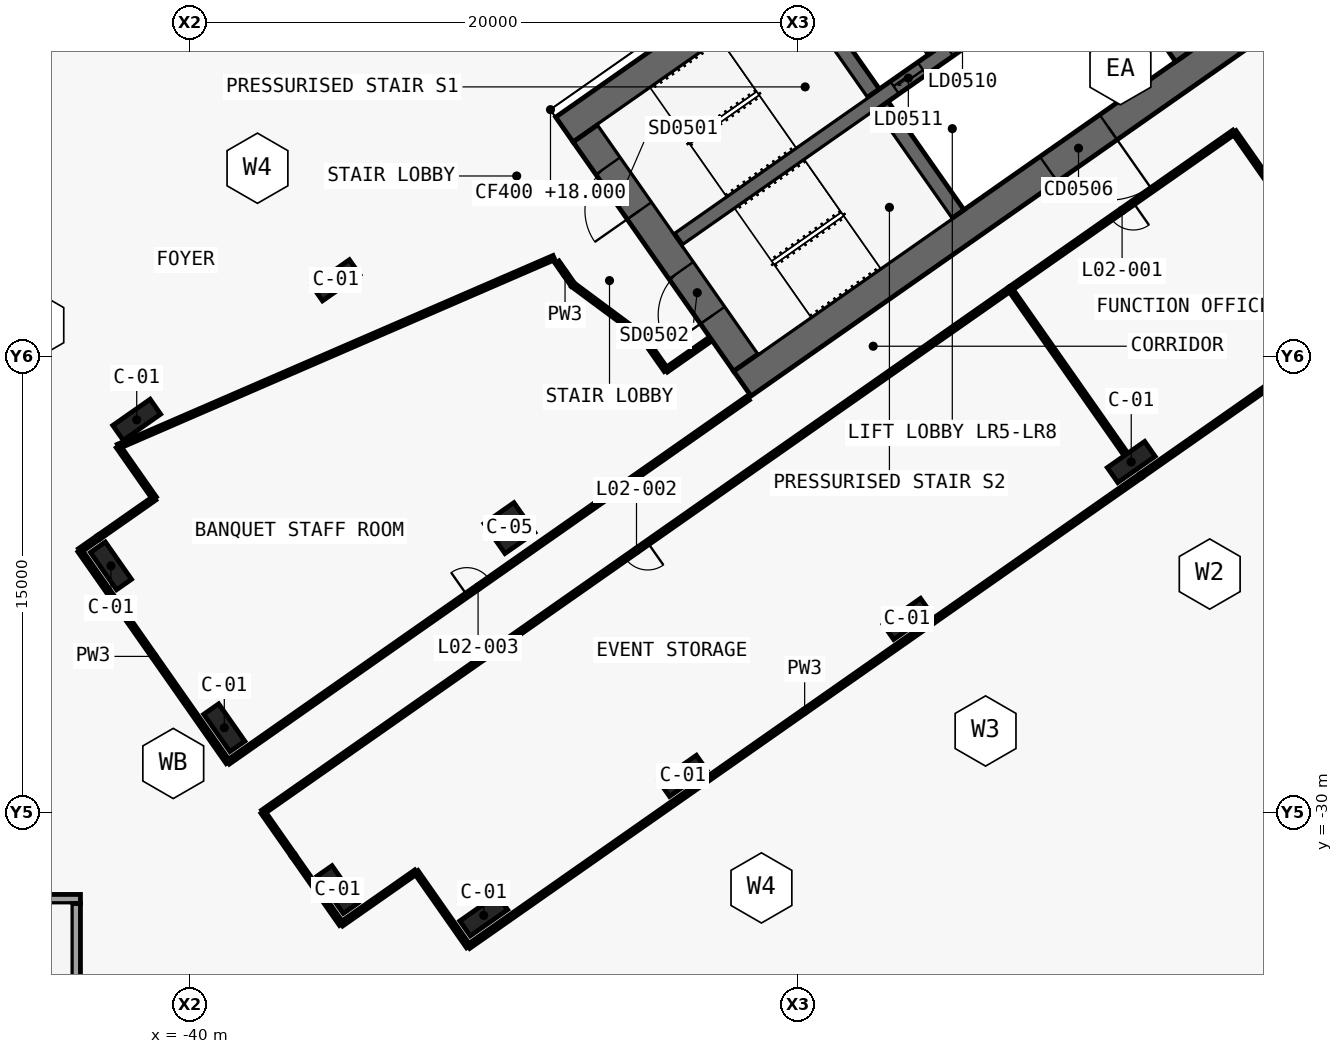
"""IFC4 building model, lengths in metres.
Left out: names, types, materials, properties, quantities, classifications, styles, units other than length and angle.
Written with IfcOpenShell. Run it as: python <this file> out.ifc"""

import sys

from ifc_helpers import new_model, si_unit, direction, frame, frame_2d, origin, origin_2d, place, context, subcontext, project, spatial, polyline, rectangle, outline, extrude, element, fill, save


model = new_model("IFC4")
c1 = context("Model", 3, precision=1e-05, world=origin(), true_north=direction((0.0, 1.0)))
c2 = subcontext(c1, "Body", "Model", "MODEL_VIEW")
j1 = project(units=[si_unit("LENGTHUNIT", "METRE"), si_unit("PLANEANGLEUNIT", "RADIAN")], contexts=[c1])
p1 = place(None, origin())
s1 = spatial("IfcSite", under=j1, at=p1, CompositionType="ELEMENT")
p2 = place(p1, origin())
s2 = spatial("IfcBuilding", under=s1, at=p2, CompositionType="ELEMENT")
p3 = place(p2, frame((0.0, 0.0, 18.0)))
s3 = spatial("IfcBuildingStorey", under=s2, at=p3, CompositionType="ELEMENT", Elevation=18.0)
p4 = place(p3, frame((0.037, 11.867, 0.0), z_axis=(0.0, 0.0, 1.0), x_axis=(-0.819155306259, -0.573571777746, 0.0)))
e1 = element("IfcWall", 1, at=p4, inside=s3, PredefinedType="SHEAR", context=c2, shape_type="SweptSolid", body=[
    extrude(outline(polyline([(33.837, 0.5), (0.7, 0.5), (0.0, -0.5), (33.837, -0.5), (33.837, 0.5)])), origin(), (0.0, 0.0, 1.0), 8.0),
])
p5 = place(p3, frame((0.037, -0.585, 0.0), z_axis=(0.0, 0.0, 1.0), x_axis=(-0.819157152511, -0.573569140985, 0.0)))
e2 = element("IfcWall", 2, at=p5, inside=s3, PredefinedType="SHEAR", context=c2, shape_type="SweptSolid", body=[
    extrude(outline(polyline([(26.695, 0.5), (0.7, 0.5), (0.0, -0.5), (26.695, -0.5), (26.695, 0.5)])), origin(), (0.0, 0.0, 1.0), 8.0),
])
p6 = place(p5, frame((2.995, 0.0, 0.0)))
e3 = element("IfcOpeningElement", 3, at=p6, cuts=e2, PredefinedType="OPENING", context=c2, shape_type="SweptSolid", body=[
    extrude(rectangle(XDim=2.4, YDim=2.1, at=frame_2d((1.2, 1.05))), frame((0.0, 0.51, 0.0), z_axis=(0.0, -1.0, 0.0), x_axis=(1.0, 0.0, 0.0)), (0.0, 0.0, 1.0), 1.02),
])
p7 = place(p5, frame((11.995, 0.0, 0.0)))
e4 = element("IfcOpeningElement", 4, at=p7, cuts=e2, PredefinedType="OPENING", context=c2, shape_type="SweptSolid", body=[
    extrude(rectangle(XDim=2.4, YDim=2.1, at=frame_2d((1.2, 1.05))), frame((0.0, 0.51, 0.0), z_axis=(0.0, -1.0, 0.0), x_axis=(1.0, 0.0, 0.0)), (0.0, 0.0, 1.0), 1.02),
])
p8 = place(p3, frame((-21.708, -15.2, 0.0), z_axis=(0.0, 0.0, 1.0), x_axis=(-0.573576324356, 0.819152122709, 0.0)))
e5 = element("IfcWall", 5, at=p8, inside=s3, PredefinedType="SHEAR", context=c2, shape_type="SweptSolid", body=[
    extrude(outline(polyline([(0.0, 0.5), (0.0, -0.5), (9.2, -0.5), (9.2, 0.5), (0.0, 0.5)])), origin(), (0.0, 0.0, 1.0), 8.0),
])
p9 = place(p8, frame((6.1, 0.0, 0.0)))
e6 = element("IfcOpeningElement", 6, at=p9, cuts=e5, PredefinedType="OPENING", context=c2, shape_type="SweptSolid", body=[
    extrude(rectangle(XDim=1.8, YDim=2.1, at=frame_2d((0.9, 1.05))), frame((0.0, 0.51, 0.0), z_axis=(0.0, -1.0, 0.0), x_axis=(1.0, 0.0, 0.0)), (0.0, 0.0, 1.0), 1.02),
])
p10 = place(p8, frame((1.9, 0.0, 0.0)))
e7 = element("IfcOpeningElement", 7, at=p10, cuts=e5, PredefinedType="OPENING", context=c2, shape_type="SweptSolid", body=[
    extrude(rectangle(XDim=1.8, YDim=2.1, at=frame_2d((0.9, 1.05))), frame((0.0, 0.51, 0.0), z_axis=(0.0, -1.0, 0.0), x_axis=(1.0, 0.0, 0.0)), (0.0, 0.0, 1.0), 1.02),
])
p11 = place(p3, frame((-7.372, -5.162, 0.0), z_axis=(0.0, 0.0, 1.0), x_axis=(-0.573594173421, 0.819139624372, 0.0)))
e8 = element("IfcWall", 8, at=p11, inside=s3, PredefinedType="SHEAR", context=c2, shape_type="SweptSolid", body=[
    extrude(outline(polyline([(4.35, 0.25), (0.0, 0.25), (0.0, -0.25), (4.35, -0.25), (4.35, 0.25)])), origin(), (0.0, 0.0, 1.0), 8.0),
])
p12 = place(p3, frame((-14.745, -10.324, 0.0), z_axis=(0.0, 0.0, 1.0), x_axis=(-0.57356780395, 0.819158088694, 0.0)))
e9 = element("IfcWall", 9, at=p12, inside=s3, PredefinedType="SHEAR", context=c2, shape_type="SweptSolid", body=[
    extrude(outline(polyline([(4.35, 0.25), (0.0, 0.25), (0.0, -0.25), (4.35, -0.25), (4.35, 0.25)])), origin(), (0.0, 0.0, 1.0), 8.0),
])
p13 = place(p3, frame((-17.527, -6.352, 0.0), z_axis=(0.0, 0.0, 1.0), x_axis=(-0.573530143085, 0.819184457233, 0.0)))
e10 = element("IfcWall", 10, at=p13, inside=s3, PredefinedType="SHEAR", context=c2, shape_type="SweptSolid", body=[
    extrude(outline(polyline([(4.35, -0.25), (4.35, 0.25), (0.0, 0.25), (0.0, -0.25), (4.35, -0.25)])), origin(), (0.0, 0.0, 1.0), 8.0),
])
p14 = place(p3, frame((-2.638, 3.768, 0.0), z_axis=(0.0, 0.0, 1.0), x_axis=(-0.819148977158, -0.573580816643, 0.0)))
e11 = element("IfcWall", 11, at=p14, inside=s3, PredefinedType="SHEAR", context=c2, shape_type="SweptSolid", body=[
    extrude(outline(polyline([(26.0, 0.25), (0.0, 0.25), (0.0, -0.25), (26.0, -0.25), (26.0, 0.25)])), origin(), (0.0, 0.0, 1.0), 8.0),
])
p15 = place(p14, frame((1.169, 0.0, 0.0)))
e12 = element("IfcOpeningElement", 12, at=p15, cuts=e11, PredefinedType="OPENING", context=c2, shape_type="SweptSolid", body=[
    extrude(rectangle(XDim=1.1, YDim=2.1, at=frame_2d((0.55, 1.05))), frame((0.0, 0.26, 0.0), z_axis=(0.0, -1.0, 0.0), x_axis=(1.0, 0.0, 0.0)), (0.0, 0.0, 1.0), 0.52),
])
p16 = place(p14, frame((3.206, 0.0, 0.0)))
e13 = element("IfcOpeningElement", 13, at=p16, cuts=e11, PredefinedType="OPENING", context=c2, shape_type="SweptSolid", body=[
    extrude(rectangle(XDim=1.1, YDim=2.1, at=frame_2d((0.55, 1.05))), frame((0.0, 0.26, 0.0), z_axis=(0.0, -1.0, 0.0), x_axis=(1.0, 0.0, 0.0)), (0.0, 0.0, 1.0), 0.52),
])
p17 = place(p14, frame((5.244, 0.0, 0.0)))
e14 = element("IfcOpeningElement", 14, at=p17, cuts=e11, PredefinedType="OPENING", context=c2, shape_type="SweptSolid", body=[
    extrude(rectangle(XDim=1.1, YDim=2.1, at=frame_2d((0.55, 1.05))), frame((0.0, 0.26, 0.0), z_axis=(0.0, -1.0, 0.0), x_axis=(1.0, 0.0, 0.0)), (0.0, 0.0, 1.0), 0.52),
])
p18 = place(p14, frame((7.281, 0.0, 0.0)))
e15 = element("IfcOpeningElement", 15, at=p18, cuts=e11, PredefinedType="OPENING", context=c2, shape_type="SweptSolid", body=[
    extrude(rectangle(XDim=1.1, YDim=2.1, at=frame_2d((0.55, 1.05))), frame((0.0, 0.26, 0.0), z_axis=(0.0, -1.0, 0.0), x_axis=(1.0, 0.0, 0.0)), (0.0, 0.0, 1.0), 0.52),
])
p19 = place(p14, frame((9.688, 0.0, 0.0)))
e16 = element("IfcOpeningElement", 16, at=p19, cuts=e11, PredefinedType="OPENING", context=c2, shape_type="SweptSolid", body=[
    extrude(rectangle(XDim=1.1, YDim=2.1, at=frame_2d((0.55, 1.05))), frame((0.0, 0.26, 0.0), z_axis=(0.0, -1.0, 0.0), x_axis=(1.0, 0.0, 0.0)), (0.0, 0.0, 1.0), 0.52),
])
p20 = place(p14, frame((11.863, 0.0, 0.0)))
e17 = element("IfcOpeningElement", 17, at=p20, cuts=e11, PredefinedType="OPENING", context=c2, shape_type="SweptSolid", body=[
    extrude(rectangle(XDim=1.1, YDim=2.1, at=frame_2d((0.55, 1.05))), frame((0.0, 0.26, 0.0), z_axis=(0.0, -1.0, 0.0), x_axis=(1.0, 0.0, 0.0)), (0.0, 0.0, 1.0), 0.52),
])
p21 = place(p14, frame((14.038, 0.0, 0.0)))
e18 = element("IfcOpeningElement", 18, at=p21, cuts=e11, PredefinedType="OPENING", context=c2, shape_type="SweptSolid", body=[
    extrude(rectangle(XDim=1.1, YDim=2.1, at=frame_2d((0.55, 1.05))), frame((0.0, 0.26, 0.0), z_axis=(0.0, -1.0, 0.0), x_axis=(1.0, 0.0, 0.0)), (0.0, 0.0, 1.0), 0.52),
])
p22 = place(p14, frame((16.212, 0.0, 0.0)))
e19 = element("IfcOpeningElement", 19, at=p22, cuts=e11, PredefinedType="OPENING", context=c2, shape_type="SweptSolid", body=[
    extrude(rectangle(XDim=1.1, YDim=2.1, at=frame_2d((0.55, 1.05))), frame((0.0, 0.26, 0.0), z_axis=(0.0, -1.0, 0.0), x_axis=(1.0, 0.0, 0.0)), (0.0, 0.0, 1.0), 0.52),
])
p23 = place(p3, frame((-49.4, -32.85, 0.0), z_axis=(0.0, 0.0, 1.0), x_axis=(1.0, 0.0, 0.0)))
e20 = element("IfcWall", 20, at=p23, inside=s3, PredefinedType="SOLIDWALL", context=c2, shape_type="SweptSolid", body=[
    extrude(rectangle(XDim=5.8, YDim=0.3, at=frame_2d((2.9, 0.0))), origin(), (0.0, 0.0, 1.0), 8.0),
])
p24 = place(p3, frame((-43.75, -43.0, 0.0), z_axis=(0.0, 0.0, 1.0), x_axis=(0.0, 1.0, 0.0)))
e21 = element("IfcWall", 21, at=p24, inside=s3, PredefinedType="SOLIDWALL", context=c2, shape_type="SweptSolid", body=[
    extrude(rectangle(XDim=10.0, YDim=0.3, at=frame_2d((5.0, 0.0))), origin(), (0.0, 0.0, 1.0), 8.0),
])
p25 = place(p24, frame((0.212, 0.0, 0.0)))
e22 = element("IfcOpeningElement", 22, at=p25, cuts=e21, PredefinedType="OPENING", context=c2, shape_type="SweptSolid", body=[
    extrude(rectangle(XDim=2.1, YDim=2.1, at=frame_2d((1.05, 1.05))), frame((0.0, 0.16, 0.0), z_axis=(0.0, -1.0, 0.0), x_axis=(1.0, 0.0, 0.0)), (0.0, 0.0, 1.0), 0.32),
])
for number, where, z_axis, x_axis in (
    (23, (-9.038, -18.475, 0.0), (0.0, 0.0, 1.0), (-0.819, -0.574, 0.0)),
    (24, (-16.41, -23.637, 0.0), (0.0, 0.0, 1.0), (-0.819, -0.574, 0.0)),
    (25, (-23.782, -28.799, 0.0), (0.0, 0.0, 1.0), (-0.819, -0.574, 0.0)),
    (26, (-30.336, -33.388, 0.0), (0.0, 0.0, 1.0), (-0.819, -0.574, 0.0)),
    (27, (-35.197, -12.498, 0.0), (0.0, 0.0, 1.0), (-0.819, -0.574, 0.0)),
    (28, (-41.75, -17.087, 0.0), (0.0, 0.0, 1.0), (-0.819, -0.574, 0.0)),
    (29, (-35.14, -32.541, 0.0), (0.0, 0.0, 1.0), (-0.574, 0.819, 0.0)),
    (30, (-38.869, -27.216, 0.0), (0.0, 0.0, 1.0), (-0.574, 0.819, 0.0)),
    (31, (-42.597, -21.892, 0.0), (0.0, 0.0, 1.0), (-0.574, 0.819, 0.0)),
):
    element("IfcColumn", number, at=place(p3, frame(where, z_axis=z_axis, x_axis=x_axis)), inside=s3, PredefinedType="COLUMN", context=c2, shape_type="SweptSolid", body=[
        extrude(rectangle(XDim=1.5, YDim=0.6, at=origin_2d()), origin(), (0.0, 0.0, 1.0), 8.0),
    ])
p26 = place(p3, frame((-29.49, -20.649, 0.0), z_axis=(0.0, 0.0, 1.0), x_axis=(-0.819152044289, -0.573576436351, 0.0)))
e32 = element("IfcColumn", 32, at=p26, inside=s3, PredefinedType="COLUMN", context=c2, shape_type="SweptSolid", body=[
    extrude(rectangle(XDim=1.2, YDim=1.2, at=origin_2d()), origin(), (0.0, 0.0, 1.0), 8.0),
])
p27 = place(p3, frame((-15.622, -5.018, 0.0), z_axis=(0.0, 0.0, 1.0), x_axis=(-0.573594173421, 0.819139624372, 0.0)))
e33 = element("IfcWall", 33, at=p27, inside=s3, PredefinedType="SOLIDWALL", context=c2, shape_type="SweptSolid", body=[
    extrude(rectangle(XDim=4.35, YDim=0.2, at=frame_2d((2.175, 0.0))), origin(), (0.0, 0.0, 1.0), 8.0),
])
p28 = place(p3, frame((-38.746, -28.351, 0.0), z_axis=(0.0, 0.0, 1.0), x_axis=(0.819148965066, 0.573580833911, 0.0)))
e34 = element("IfcWall", 34, at=p28, inside=s3, PredefinedType="PARTITIONING", context=c2, shape_type="SweptSolid", body=[
    extrude(rectangle(XDim=20.88, YDim=0.15, at=frame_2d((10.44, 0.0))), origin(), (0.0, 0.0, 1.0), 6.18),
])
p29 = place(p28, frame((9.59, 0.0, 0.0)))
e35 = element("IfcOpeningElement", 35, at=p29, cuts=e34, PredefinedType="OPENING", context=c2, shape_type="SweptSolid", body=[
    extrude(rectangle(XDim=0.9, YDim=2.1, at=frame_2d((0.45, 1.05))), frame((0.0, 0.085, 0.0), z_axis=(0.0, -1.0, 0.0), x_axis=(1.0, 0.0, 0.0)), (0.0, 0.0, 1.0), 0.17),
])
p30 = place(p3, frame((-5.652, -7.62, 0.0), z_axis=(0.0, 0.0, 1.0), x_axis=(-0.81915291695, -0.57357519006, 0.0)))
e36 = element("IfcWall", 36, at=p30, inside=s3, PredefinedType="PARTITIONING", context=c2, shape_type="SweptSolid", body=[
    extrude(rectangle(XDim=9.002, YDim=0.15, at=frame_2d((4.501, 0.0))), origin(), (0.0, 0.0, 1.0), 6.18),
])
p31 = place(p30, frame((4.051, 0.0, 0.0)))
e37 = element("IfcOpeningElement", 37, at=p31, cuts=e36, PredefinedType="OPENING", context=c2, shape_type="SweptSolid", body=[
    extrude(rectangle(XDim=0.9, YDim=2.1, at=frame_2d((0.45, 1.05))), frame((0.0, 0.085, 0.0), z_axis=(0.0, -1.0, 0.0), x_axis=(1.0, 0.0, 0.0)), (0.0, 0.0, 1.0), 0.17),
])
p32 = place(p3, frame((-13.022, -12.781, 0.0), z_axis=(0.0, 0.0, 1.0), x_axis=(-0.819154688631, -0.57357265982, 0.0)))
e38 = element("IfcWall", 38, at=p32, inside=s3, PredefinedType="PARTITIONING", context=c2, shape_type="SweptSolid", body=[
    extrude(rectangle(XDim=30.002, YDim=0.15, at=frame_2d((15.001, 0.0))), origin(), (0.0, 0.0, 1.0), 6.18),
])
p33 = place(p32, frame((14.551, 0.0, 0.0)))
e39 = element("IfcOpeningElement", 39, at=p33, cuts=e38, PredefinedType="OPENING", context=c2, shape_type="SweptSolid", body=[
    extrude(rectangle(XDim=0.9, YDim=2.1, at=frame_2d((0.45, 1.05))), frame((0.0, 0.085, 0.0), z_axis=(0.0, -1.0, 0.0), x_axis=(1.0, 0.0, 0.0)), (0.0, 0.0, 1.0), 0.17),
])
p34 = place(p3, frame((-8.723, -18.927, 0.0), z_axis=(0.0, 0.0, 1.0), x_axis=(0.81913387212, 0.573602388024, 0.0)))
e40 = element("IfcWall", 40, at=p34, inside=s3, PredefinedType="PARTITIONING", context=c2, shape_type="SweptSolid", body=[
    extrude(rectangle(XDim=6.552, YDim=0.15, at=frame_2d((3.276, 0.0))), origin(), (0.0, 0.0, 1.0), 7.6),
])
p35 = place(p3, frame((-35.017, -33.676, 0.0), z_axis=(0.0, 0.0, 1.0), x_axis=(0.81917072002, 0.573549763719, 0.0)))
e41 = element("IfcWall", 41, at=p35, inside=s3, PredefinedType="PARTITIONING", context=c2, shape_type="SweptSolid", body=[
    extrude(rectangle(XDim=2.999, YDim=0.15, at=frame_2d((1.5, 0.0))), origin(), (0.0, 0.0, 1.0), 6.38),
])
p36 = place(p3, frame((-32.56, -31.956, 0.0), z_axis=(0.0, 0.0, 1.0), x_axis=(0.573604390867, -0.819132469615, 0.0)))
e42 = element("IfcWall", 42, at=p36, inside=s3, PredefinedType="PARTITIONING", context=c2, shape_type="SweptSolid", body=[
    extrude(rectangle(XDim=2.999, YDim=0.15, at=frame_2d((1.5, 0.0))), origin(), (0.0, 0.0, 1.0), 6.38),
])
p37 = place(p3, frame((-30.839, -34.413, 0.0), z_axis=(0.0, 0.0, 1.0), x_axis=(0.819150779762, 0.573578242279, 0.0)))
e43 = element("IfcWall", 43, at=p37, inside=s3, PredefinedType="PARTITIONING", context=c2, shape_type="SweptSolid", body=[
    extrude(rectangle(XDim=27.002, YDim=0.15, at=frame_2d((13.501, 0.0))), origin(), (0.0, 0.0, 1.0), 6.58),
])
p38 = place(p3, frame((-36.599, -31.418, 0.0), z_axis=(0.0, 0.0, 1.0), x_axis=(0.57362881286, -0.819115367367, 0.0)))
e44 = element("IfcWall", 44, at=p38, inside=s3, PredefinedType="PARTITIONING", context=c2, shape_type="SweptSolid", body=[
    extrude(rectangle(XDim=2.756, YDim=0.15, at=frame_2d((1.378, 0.0))), origin(), (0.0, 0.0, 1.0), 7.6),
])
p39 = place(p3, frame((-42.359, -17.961, 0.0), z_axis=(0.0, 0.0, 1.0), x_axis=(0.573603984281, -0.819132754331, 0.0)))
e45 = element("IfcWall", 45, at=p39, inside=s3, PredefinedType="PARTITIONING", context=c2, shape_type="SweptSolid", body=[
    extrude(rectangle(XDim=2.082, YDim=0.15, at=frame_2d((1.041, 0.0))), origin(), (0.0, 0.0, 1.0), 6.38),
])
p40 = place(p3, frame((-41.165, -19.667, 0.0), z_axis=(0.0, 0.0, 1.0), x_axis=(-0.819149945048, -0.573579434366, 0.0)))
e46 = element("IfcWall", 46, at=p40, inside=s3, PredefinedType="PARTITIONING", context=c2, shape_type="SweptSolid", body=[
    extrude(rectangle(XDim=2.239, YDim=0.15, at=frame_2d((1.119, 0.0))), origin(), (0.0, 0.0, 1.0), 6.38),
])
p41 = place(p3, frame((-43.622, -21.387, 0.0), z_axis=(0.0, 0.0, 1.0), x_axis=(0.573487395822, -0.819214383928, 0.0)))
e47 = element("IfcWall", 47, at=p41, inside=s3, PredefinedType="PARTITIONING", context=c2, shape_type="SweptSolid", body=[
    extrude(rectangle(XDim=8.503, YDim=0.15, at=frame_2d((4.251, 0.0))), origin(), (0.0, 0.0, 1.0), 7.6),
])
p42 = place(p3, frame((-43.0, -20.952, 0.0), z_axis=(0.0, 0.0, 1.0), x_axis=(-0.819216809636, -0.573483930734, 0.0)))
e48 = element("IfcWall", 48, at=p42, inside=s3, PredefinedType="PARTITIONING", context=c2, shape_type="SweptSolid", body=[
    extrude(rectangle(XDim=0.759, YDim=0.15, at=frame_2d((0.379, 0.0))), origin(), (0.0, 0.0, 1.0), 7.6),
])
p43 = place(p3, frame((-37.6, -29.988, 0.0), z_axis=(0.0, 0.0, 1.0), x_axis=(0.573518712821, -0.819192459709, 0.0)))
e49 = element("IfcWall", 49, at=p43, inside=s3, PredefinedType="PARTITIONING", context=c2, shape_type="SweptSolid", body=[
    extrude(rectangle(XDim=1.744, YDim=0.15, at=frame_2d((0.872, 0.0))), origin(), (0.0, 0.0, 1.0), 7.6),
])
p44 = place(p3, frame((-1.849, -13.051, 0.0), z_axis=(0.0, 0.0, 1.0), x_axis=(-0.573575988258, 0.819152358047, 0.0)))
e50 = element("IfcWall", 50, at=p44, inside=s3, PredefinedType="PARTITIONING", context=c2, shape_type="SweptSolid", body=[
    extrude(rectangle(XDim=6.632, YDim=0.15, at=frame_2d((3.316, 0.0))), origin(), (0.0, 0.0, 1.0), 6.18),
])
p45 = place(p3, frame((-28.026, -11.751, 0.0), z_axis=(0.0, 0.0, 1.0), x_axis=(-0.91753357696, -0.397658314577, 0.0)))
e51 = element("IfcWall", 51, at=p45, inside=s3, PredefinedType="PARTITIONING", context=c2, shape_type="SweptSolid", body=[
    extrude(rectangle(XDim=15.621, YDim=0.15, at=frame_2d((7.811, 0.0))), origin(), (0.0, 0.0, 1.0), 6.18),
])
p46 = place(p3, frame((-22.961, -14.49, 0.0), z_axis=(0.0, 0.0, 1.0), x_axis=(-0.819109000826, -0.573637903879, 0.0)))
e52 = element("IfcWall", 52, at=p46, inside=s3, PredefinedType="PARTITIONING", context=c2, shape_type="SweptSolid", body=[
    extrude(rectangle(XDim=1.68, YDim=0.15, at=frame_2d((0.84, 0.0))), origin(), (0.0, 0.0, 1.0), 7.6),
])
p47 = place(p3, frame((-24.337, -15.454, 0.0), z_axis=(0.0, 0.0, 1.0), x_axis=(-0.573571252353, 0.819155674139, 0.0)))
e53 = element("IfcWall", 53, at=p47, inside=s3, PredefinedType="PARTITIONING", context=c2, shape_type="SweptSolid", body=[
    extrude(rectangle(XDim=1.354, YDim=0.15, at=frame_2d((0.677, 0.0))), origin(), (0.0, 0.0, 1.0), 7.6),
])
p48 = place(p3, frame((-25.114, -14.345, 0.0), z_axis=(0.0, 0.0, 1.0), x_axis=(-0.803169525988, 0.59575054555, 0.0)))
e54 = element("IfcWall", 54, at=p48, inside=s3, PredefinedType="PARTITIONING", context=c2, shape_type="SweptSolid", body=[
    extrude(rectangle(XDim=2.846, YDim=0.15, at=frame_2d((1.423, 0.0))), origin(), (0.0, 0.0, 1.0), 7.6),
])
p49 = place(p3, frame((-27.4, -12.649, 0.0), z_axis=(0.0, 0.0, 1.0), x_axis=(-0.573713979357, 0.819055718428, 0.0)))
e55 = element("IfcWall", 55, at=p49, inside=s3, PredefinedType="PARTITIONING", context=c2, shape_type="SweptSolid", body=[
    extrude(rectangle(XDim=0.912, YDim=0.15, at=frame_2d((0.456, 0.0))), origin(), (0.0, 0.0, 1.0), 7.6),
])
p50 = place(p3, frame((-9.221, -18.213, 0.0), z_axis=(0.0, 0.0, 1.0), x_axis=(-0.573556251799, 0.819166177294, 0.0)))
e56 = element("IfcWall", 56, at=p50, inside=s3, PredefinedType="PARTITIONING", context=c2, shape_type="SweptSolid", body=[
    extrude(rectangle(XDim=6.63, YDim=0.15, at=frame_2d((3.315, 0.0))), origin(), (0.0, 0.0, 1.0), 6.18),
])
p51 = place(p22, origin())
e57 = element("IfcDoor", 57, at=p51, inside=s3, OperationType="SLIDING_TO_RIGHT", PredefinedType="DOOR", context=c2, shape_type="SweptSolid", body=[
    extrude(rectangle(XDim=1.1, YDim=2.1, at=frame_2d((0.55, 1.05))), frame((0.0, 0.025, 0.0), z_axis=(0.0, -1.0, 0.0), x_axis=(1.0, 0.0, 0.0)), (0.0, 0.0, 1.0), 0.05),
])
fill(e19, e57)
p52 = place(p7, origin())
e58 = element("IfcDoor", 58, at=p52, inside=s3, OperationType="DOUBLE_DOOR_SINGLE_SWING", PredefinedType="DOOR", context=c2, shape_type="SweptSolid", body=[
    extrude(rectangle(XDim=2.4, YDim=2.1, at=frame_2d((1.2, 1.05))), frame((0.0, 0.025, 0.0), z_axis=(0.0, -1.0, 0.0), x_axis=(1.0, 0.0, 0.0)), (0.0, 0.0, 1.0), 0.05),
])
fill(e4, e58)
p53 = place(p9, origin())
e59 = element("IfcDoor", 59, at=p53, inside=s3, OperationType="DOUBLE_DOOR_SINGLE_SWING", PredefinedType="DOOR", context=c2, shape_type="SweptSolid", body=[
    extrude(rectangle(XDim=1.8, YDim=2.1, at=frame_2d((0.9, 1.05))), frame((0.0, 0.025, 0.0), z_axis=(0.0, -1.0, 0.0), x_axis=(1.0, 0.0, 0.0)), (0.0, 0.0, 1.0), 0.05),
])
fill(e6, e59)
p54 = place(p10, origin())
e60 = element("IfcDoor", 60, at=p54, inside=s3, OperationType="DOUBLE_DOOR_SINGLE_SWING", PredefinedType="DOOR", context=c2, shape_type="SweptSolid", body=[
    extrude(rectangle(XDim=1.8, YDim=2.1, at=frame_2d((0.9, 1.05))), frame((0.0, 0.025, 0.0), z_axis=(0.0, -1.0, 0.0), x_axis=(1.0, 0.0, 0.0)), (0.0, 0.0, 1.0), 0.05),
])
fill(e7, e60)
p55 = place(p31, origin())
e61 = element("IfcDoor", 61, at=p55, inside=s3, OperationType="SINGLE_SWING_RIGHT", PredefinedType="DOOR", context=c2, shape_type="SweptSolid", body=[
    extrude(rectangle(XDim=0.9, YDim=2.1, at=frame_2d((0.45, 1.05))), frame((0.0, 0.025, 0.0), z_axis=(0.0, -1.0, 0.0), x_axis=(1.0, 0.0, 0.0)), (0.0, 0.0, 1.0), 0.05),
])
fill(e37, e61)
p56 = place(p33, origin())
e62 = element("IfcDoor", 62, at=p56, inside=s3, OperationType="SINGLE_SWING_RIGHT", PredefinedType="DOOR", context=c2, shape_type="SweptSolid", body=[
    extrude(rectangle(XDim=0.9, YDim=2.1, at=frame_2d((0.45, 1.05))), frame((0.0, 0.025, 0.0), z_axis=(0.0, -1.0, 0.0), x_axis=(1.0, 0.0, 0.0)), (0.0, 0.0, 1.0), 0.05),
])
fill(e39, e62)
p57 = place(p29, origin())
e63 = element("IfcDoor", 63, at=p57, inside=s3, OperationType="SINGLE_SWING_LEFT", PredefinedType="DOOR", context=c2, shape_type="SweptSolid", body=[
    extrude(rectangle(XDim=0.9, YDim=2.1, at=frame_2d((0.45, 1.05))), frame((0.0, 0.025, 0.0), z_axis=(0.0, -1.0, 0.0), x_axis=(1.0, 0.0, 0.0)), (0.0, 0.0, 1.0), 0.05),
])
fill(e35, e63)
save(model, sys.argv[1])
